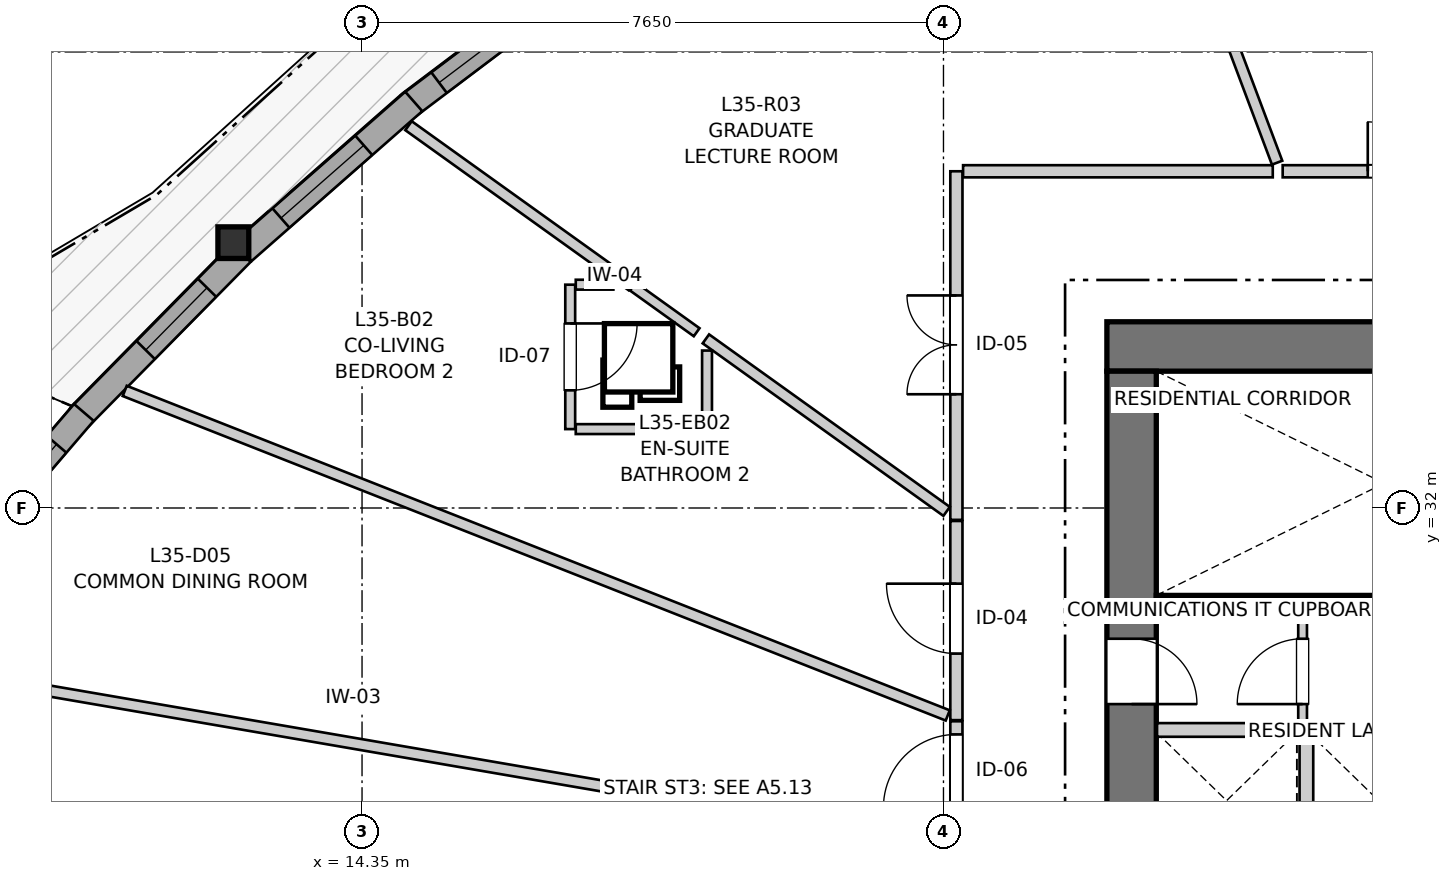
"""IFC4 building model, lengths in metres.
Left out: names, types, materials, properties, quantities, classifications, styles, units other than length and angle.
Written with IfcOpenShell. Run it as: python <this file> out.ifc"""

import sys

from ifc_helpers import new_model, si_unit, direction, frame, frame_2d, origin, origin_2d, place, context, subcontext, project, spatial, rectangle, i_section, extrude, source, transform, mapped, element, fill, save


model = new_model("IFC4")
c1 = context("Model", 3, precision=1e-05, world=origin(), true_north=direction((0.0, 1.0)))
c2 = subcontext(c1, "Body", "Model", "MODEL_VIEW")
j1 = project(units=[si_unit("LENGTHUNIT", "METRE"), si_unit("PLANEANGLEUNIT", "RADIAN")], contexts=[c1])
p1 = place(None, origin())
s1 = spatial("IfcSite", under=j1, at=p1, CompositionType="ELEMENT")
p2 = place(p1, origin())
s2 = spatial("IfcBuilding", under=s1, at=p2, CompositionType="ELEMENT")
p3 = place(p2, frame((0.0, 0.0, 118.4)))
s3 = spatial("IfcBuildingStorey", under=s2, at=p3, CompositionType="ELEMENT", Elevation=118.4)
p4 = place(p3, frame((36.55, 34.125, 0.0), z_axis=(0.0, 0.0, 1.0), x_axis=(-1.0, 0.0, 0.0)))
e1 = element("IfcWall", 1, at=p4, inside=s3, PredefinedType="SHEAR", context=c2, shape_type="SweptSolid", body=[
    extrude(rectangle(XDim=12.4, YDim=0.65, at=frame_2d((6.2, 0.0))), origin(), (0.0, 0.0, 1.0), 2.95),
])
p5 = place(p3, frame((24.475, 33.8, 0.0), z_axis=(0.0, 0.0, 1.0), x_axis=(0.0, -1.0, 0.0)))
e2 = element("IfcWall", 2, at=p5, inside=s3, PredefinedType="SHEAR", context=c2, shape_type="SweptSolid", body=[
    extrude(rectangle(XDim=15.6, YDim=0.65, at=frame_2d((7.8, 0.0))), origin(), (0.0, 0.0, 1.0), 2.95),
])
p6 = place(p5, frame((7.05, 0.0, 0.0)))
e3 = element("IfcOpeningElement", 3, at=p6, cuts=e2, PredefinedType="OPENING", context=c2, shape_type="SweptSolid", body=[
    extrude(rectangle(XDim=1.5, YDim=2.15, at=frame_2d((0.75, 1.075))), frame((0.0, 0.335, 0.0), z_axis=(0.0, -1.0, 0.0), x_axis=(1.0, 0.0, 0.0)), (0.0, 0.0, 1.0), 0.67),
])
p7 = place(p5, frame((3.52, 0.0, 0.0)))
e4 = element("IfcOpeningElement", 4, at=p7, cuts=e2, PredefinedType="OPENING", context=c2, shape_type="SweptSolid", body=[
    extrude(rectangle(XDim=0.86, YDim=2.05, at=frame_2d((0.43, 1.025))), frame((0.0, 0.335, 0.0), z_axis=(0.0, -1.0, 0.0), x_axis=(1.0, 0.0, 0.0)), (0.0, 0.0, 1.0), 0.67),
])
p8 = place(p5, frame((11.22, 0.0, 0.0)))
e5 = element("IfcOpeningElement", 5, at=p8, cuts=e2, PredefinedType="OPENING", context=c2, shape_type="SweptSolid", body=[
    extrude(rectangle(XDim=0.86, YDim=2.05, at=frame_2d((0.43, 1.025))), frame((0.0, 0.335, 0.0), z_axis=(0.0, -1.0, 0.0), x_axis=(1.0, 0.0, 0.0)), (0.0, 0.0, 1.0), 0.67),
])
p9 = place(p3, frame((24.8, 30.7, 0.0), z_axis=(0.0, 0.0, 1.0), x_axis=(1.0, 0.0, 0.0)))
e6 = element("IfcWall", 6, at=p9, inside=s3, PredefinedType="SHEAR", context=c2, shape_type="SweptSolid", body=[
    extrude(rectangle(XDim=11.1, YDim=0.3, at=frame_2d((5.55, 0.0))), origin(), (0.0, 0.0, 1.0), 2.95),
])
p10 = place(p9, frame((6.22, 0.0, 0.0)))
e7 = element("IfcOpeningElement", 7, at=p10, cuts=e6, PredefinedType="OPENING", context=c2, shape_type="SweptSolid", body=[
    extrude(rectangle(XDim=0.98, YDim=2.15, at=frame_2d((0.49, 1.075))), frame((0.0, 0.16, 0.0), z_axis=(0.0, -1.0, 0.0), x_axis=(1.0, 0.0, 0.0)), (0.0, 0.0, 1.0), 0.32),
])
p11 = place(p9, frame((9.15, 0.0, 0.0)))
e8 = element("IfcOpeningElement", 8, at=p11, cuts=e6, PredefinedType="OPENING", context=c2, shape_type="SweptSolid", body=[
    extrude(rectangle(XDim=1.15, YDim=2.15, at=frame_2d((0.575, 1.075))), frame((0.0, 0.16, 0.0), z_axis=(0.0, -1.0, 0.0), x_axis=(1.0, 0.0, 0.0)), (0.0, 0.0, 1.0), 0.32),
])
m1 = source(origin(), c2, "Body", "SweptSolid", [
    extrude(i_section(OverallWidth=0.406, OverallDepth=0.416, WebThickness=0.027, FlangeThickness=0.044, FilletRadius=0.015, at=origin_2d()), origin(), (0.0, 0.0, 1.0), 2.95),
])
p12 = place(p3, frame((12.657, 35.491, 0.0), z_axis=(0.0, 0.0, 1.0), x_axis=(1.0, 0.0, 0.0)))
e9 = element("IfcColumn", 9, at=p12, inside=s3, PredefinedType="PILASTER", context=c2, shape_type="MappedRepresentation", body=[
    mapped(m1, transform((0.0, 0.0, 0.0), x_axis=(1.0, 0.0, 0.0), y_axis=(0.0, 1.0, 0.0), z_axis=(0.0, 0.0, 1.0), scale=1.0)),
])
p13 = place(p3, frame((17.154, 38.947, 0.0), z_axis=(0.0, 0.0, 1.0), x_axis=(-0.798332692302, -0.602216665663, 0.0)))
e10 = element("IfcWall", 10, at=p13, inside=s3, PredefinedType="SOLIDWALL", context=c2, shape_type="SweptSolid", body=[
    extrude(rectangle(XDim=2.746, YDim=0.34, at=frame_2d((1.373, 0.0))), origin(), (0.0, 0.0, 1.0), 2.48),
])
p14 = place(p13, frame((0.493, 0.0, 0.82)))
e11 = element("IfcOpeningElement", 11, at=p14, cuts=e10, PredefinedType="OPENING", context=c2, shape_type="SweptSolid", body=[
    extrude(rectangle(XDim=1.75, YDim=1.3, at=frame_2d((0.875, 0.65))), frame((0.0, 0.18, 0.0), z_axis=(0.0, -1.0, 0.0), x_axis=(1.0, 0.0, 0.0)), (0.0, 0.0, 1.0), 0.36),
])
p15 = place(p3, frame((15.031, 37.349, 0.0), z_axis=(0.0, 0.0, 1.0), x_axis=(-0.751472812955, -0.659764057364, 0.0)))
e12 = element("IfcWall", 12, at=p15, inside=s3, PredefinedType="SOLIDWALL", context=c2, shape_type="SweptSolid", body=[
    extrude(rectangle(XDim=2.99, YDim=0.34, at=frame_2d((1.495, 0.0))), origin(), (0.0, 0.0, 1.0), 2.48),
])
p16 = place(p15, frame((0.875, 0.0, 0.82)))
e13 = element("IfcOpeningElement", 13, at=p16, cuts=e12, PredefinedType="OPENING", context=c2, shape_type="SweptSolid", body=[
    extrude(rectangle(XDim=1.45, YDim=1.25, at=frame_2d((0.725, 0.625))), frame((0.0, 0.18, 0.0), z_axis=(0.0, -1.0, 0.0), x_axis=(1.0, 0.0, 0.0)), (0.0, 0.0, 1.0), 0.36),
])
p17 = place(p3, frame((12.764, 35.357, 0.0), z_axis=(0.0, 0.0, 1.0), x_axis=(-0.701906045867, -0.712269543625, 0.0)))
e14 = element("IfcWall", 14, at=p17, inside=s3, PredefinedType="SOLIDWALL", context=c2, shape_type="SweptSolid", body=[
    extrude(rectangle(XDim=3.039, YDim=0.34, at=frame_2d((1.52, 0.0))), origin(), (0.0, 0.0, 1.0), 2.48),
])
p18 = place(p17, frame((0.646, 0.0, 0.82)))
e15 = element("IfcOpeningElement", 15, at=p18, cuts=e14, PredefinedType="OPENING", context=c2, shape_type="SweptSolid", body=[
    extrude(rectangle(XDim=1.15, YDim=1.2, at=frame_2d((0.575, 0.6))), frame((0.0, 0.18, 0.0), z_axis=(0.0, -1.0, 0.0), x_axis=(1.0, 0.0, 0.0)), (0.0, 0.0, 1.0), 0.36),
])
p19 = place(p3, frame((10.69, 33.257, 0.0), z_axis=(0.0, 0.0, 1.0), x_axis=(-0.650763576187, -0.759280427714, 0.0)))
e16 = element("IfcWall", 16, at=p19, inside=s3, PredefinedType="SOLIDWALL", context=c2, shape_type="SweptSolid", body=[
    extrude(rectangle(XDim=2.893, YDim=0.34, at=frame_2d((1.447, 0.0))), origin(), (0.0, 0.0, 1.0), 2.48),
])
p20 = place(p19, frame((0.552, 0.0, 0.82)))
e17 = element("IfcOpeningElement", 17, at=p20, cuts=e16, PredefinedType="OPENING", context=c2, shape_type="SweptSolid", body=[
    extrude(rectangle(XDim=1.8, YDim=1.45, at=frame_2d((0.9, 0.725))), frame((0.0, 0.18, 0.0), z_axis=(0.0, -1.0, 0.0), x_axis=(1.0, 0.0, 0.0)), (0.0, 0.0, 1.0), 0.36),
])
p21 = place(p3, frame((24.81, 29.08, 0.0), z_axis=(0.0, 0.0, 1.0), x_axis=(1.0, 0.0, 0.0)))
e18 = element("IfcWall", 18, at=p21, inside=s3, PredefinedType="PARTITIONING", context=c2, shape_type="SweptSolid", body=[
    extrude(rectangle(XDim=5.84, YDim=0.18, at=frame_2d((2.92, 0.0))), origin(), (0.0, 0.0, 1.0), 2.95),
])
p22 = place(p3, frame((26.775, 27.2, 0.0), z_axis=(0.0, 0.0, 1.0), x_axis=(0.0, 1.0, 0.0)))
e19 = element("IfcWall", 19, at=p22, inside=s3, PredefinedType="PARTITIONING", context=c2, shape_type="SweptSolid", body=[
    extrude(rectangle(XDim=1.78, YDim=0.18, at=frame_2d((0.89, 0.0))), origin(), (0.0, 0.0, 1.0), 2.95),
])
p23 = place(p3, frame((26.725, 29.16, 0.0), z_axis=(0.0, 0.0, 1.0), x_axis=(0.0, 1.0, 0.0)))
e20 = element("IfcWall", 20, at=p23, inside=s3, PredefinedType="PARTITIONING", context=c2, shape_type="SweptSolid", body=[
    extrude(rectangle(XDim=1.38, YDim=0.115, at=frame_2d((0.69, 0.0))), origin(), (0.0, 0.0, 1.0), 2.95),
])
p24 = place(p23, frame((0.26, 0.0, 0.0)))
e21 = element("IfcOpeningElement", 21, at=p24, cuts=e20, PredefinedType="OPENING", context=c2, shape_type="SweptSolid", body=[
    extrude(rectangle(XDim=0.86, YDim=2.05, at=frame_2d((0.43, 1.025))), frame((0.0, 0.067, 0.0), z_axis=(0.0, -1.0, 0.0), x_axis=(1.0, 0.0, 0.0)), (0.0, 0.0, 1.0), 0.135),
])
p25 = place(p3, frame((22.17, 31.844, 0.0), z_axis=(0.0, 0.0, 1.0), x_axis=(0.0, 1.0, 0.0)))
e22 = element("IfcWall", 22, at=p25, inside=s3, PredefinedType="PARTITIONING", context=c2, shape_type="SweptSolid", body=[
    extrude(rectangle(XDim=4.586, YDim=0.16, at=frame_2d((2.293, 0.0))), origin(), (0.0, 0.0, 1.0), 2.95),
])
p26 = place(p25, frame((1.653, 0.0, 0.0)))
e23 = element("IfcOpeningElement", 23, at=p26, cuts=e22, PredefinedType="OPENING", context=c2, shape_type="SweptSolid", body=[
    extrude(rectangle(XDim=1.3, YDim=2.1, at=frame_2d((0.65, 1.05))), frame((0.0, 0.09, 0.0), z_axis=(0.0, -1.0, 0.0), x_axis=(1.0, 0.0, 0.0)), (0.0, 0.0, 1.0), 0.18),
])
p27 = place(p3, frame((26.463, 36.43, 0.0), z_axis=(0.0, 0.0, 1.0), x_axis=(1.0, 0.0, 0.0)))
e24 = element("IfcWall", 24, at=p27, inside=s3, PredefinedType="PARTITIONING", context=c2, shape_type="SweptSolid", body=[
    extrude(rectangle(XDim=3.585, YDim=0.16, at=frame_2d((1.792, 0.0))), origin(), (0.0, 0.0, 1.0), 2.95),
])
p28 = place(p27, frame((1.119, 0.0, 0.0)))
e25 = element("IfcOpeningElement", 25, at=p28, cuts=e24, PredefinedType="OPENING", context=c2, shape_type="SweptSolid", body=[
    extrude(rectangle(XDim=1.3, YDim=2.1, at=frame_2d((0.65, 1.05))), frame((0.0, 0.09, 0.0), z_axis=(0.0, -1.0, 0.0), x_axis=(1.0, 0.0, 0.0)), (0.0, 0.0, 1.0), 0.18),
])
p29 = place(p3, frame((22.17, 29.209, 0.0), z_axis=(0.0, 0.0, 1.0), x_axis=(0.0, 1.0, 0.0)))
e26 = element("IfcWall", 26, at=p29, inside=s3, PredefinedType="PARTITIONING", context=c2, shape_type="SweptSolid", body=[
    extrude(rectangle(XDim=2.62, YDim=0.16, at=frame_2d((1.31, 0.0))), origin(), (0.0, 0.0, 1.0), 2.95),
])
p30 = place(p29, frame((0.875, 0.0, 0.0)))
e27 = element("IfcOpeningElement", 27, at=p30, cuts=e26, PredefinedType="OPENING", context=c2, shape_type="SweptSolid", body=[
    extrude(rectangle(XDim=0.92, YDim=2.1, at=frame_2d((0.46, 1.05))), frame((0.0, 0.09, 0.0), z_axis=(0.0, -1.0, 0.0), x_axis=(1.0, 0.0, 0.0)), (0.0, 0.0, 1.0), 0.18),
])
p31 = place(p3, frame((17.089, 34.938, 0.0), z_axis=(0.0, 0.0, 1.0), x_axis=(0.0, -1.0, 0.0)))
e28 = element("IfcWall", 28, at=p31, inside=s3, PredefinedType="PARTITIONING", context=c2, shape_type="SweptSolid", body=[
    extrude(rectangle(XDim=1.9, YDim=0.13, at=frame_2d((0.95, 0.0))), origin(), (0.0, 0.0, 1.0), 2.95),
])
p32 = place(p31, frame((0.51, 0.0, 0.0)))
e29 = element("IfcOpeningElement", 29, at=p32, cuts=e28, PredefinedType="OPENING", context=c2, shape_type="SweptSolid", body=[
    extrude(rectangle(XDim=0.88, YDim=2.05, at=frame_2d((0.44, 1.025))), frame((0.0, 0.075, 0.0), z_axis=(0.0, -1.0, 0.0), x_axis=(1.0, 0.0, 0.0)), (0.0, 0.0, 1.0), 0.15),
])
p33 = place(p3, frame((22.17, 27.85, 0.0), z_axis=(0.0, 0.0, 1.0), x_axis=(0.0, 1.0, 0.0)))
e30 = element("IfcWall", 30, at=p33, inside=s3, PredefinedType="PARTITIONING", context=c2, shape_type="SweptSolid", body=[
    extrude(rectangle(XDim=1.344, YDim=0.16, at=frame_2d((0.672, 0.0))), origin(), (0.0, 0.0, 1.0), 2.95),
])
p34 = place(p33, frame((0.211, 0.0, 0.0)))
e31 = element("IfcOpeningElement", 31, at=p34, cuts=e30, PredefinedType="OPENING", context=c2, shape_type="SweptSolid", body=[
    extrude(rectangle(XDim=0.96, YDim=2.1, at=frame_2d((0.48, 1.05))), frame((0.0, 0.09, 0.0), z_axis=(0.0, -1.0, 0.0), x_axis=(1.0, 0.0, 0.0)), (0.0, 0.0, 1.0), 0.18),
])
p35 = place(p3, frame((7.893, 29.996, 0.0), z_axis=(0.0, 0.0, 1.0), x_axis=(0.985544917876, -0.169414328938, 0.0)))
e32 = element("IfcWall", 32, at=p35, inside=s3, PredefinedType="PARTITIONING", context=c2, shape_type="SweptSolid", body=[
    extrude(rectangle(XDim=12.664, YDim=0.145, at=frame_2d((6.332, 0.0))), origin(), (0.0, 0.0, 1.0), 2.95),
])
p36 = place(p3, frame((11.228, 33.54, 0.0), z_axis=(0.0, 0.0, 1.0), x_axis=(0.930301058265, -0.366796866114, 0.0)))
e33 = element("IfcWall", 33, at=p36, inside=s3, PredefinedType="PARTITIONING", context=c2, shape_type="SweptSolid", body=[
    extrude(rectangle(XDim=11.639, YDim=0.145, at=frame_2d((5.82, 0.0))), origin(), (0.0, 0.0, 1.0), 2.95),
])
p37 = place(p3, frame((24.107, 42.621, 0.0), z_axis=(0.0, 0.0, 1.0), x_axis=(0.351605509999, -0.93614826034, 0.0)))
e34 = element("IfcWall", 34, at=p37, inside=s3, PredefinedType="PARTITIONING", context=c2, shape_type="SweptSolid", body=[
    extrude(rectangle(XDim=6.493, YDim=0.145, at=frame_2d((3.247, 0.0))), origin(), (0.0, 0.0, 1.0), 2.95),
])
p38 = place(p3, frame((22.258, 36.43, 0.0), z_axis=(0.0, 0.0, 1.0), x_axis=(1.0, 0.0, 0.0)))
e35 = element("IfcWall", 35, at=p38, inside=s3, PredefinedType="PARTITIONING", context=c2, shape_type="SweptSolid", body=[
    extrude(rectangle(XDim=4.074, YDim=0.16, at=frame_2d((2.037, 0.0))), origin(), (0.0, 0.0, 1.0), 2.588),
])
p39 = place(p3, frame((18.874, 34.225, 0.0), z_axis=(0.0, 0.0, 1.0), x_axis=(0.812826521731, -0.582505833079, 0.0)))
e36 = element("IfcWall", 36, at=p39, inside=s3, PredefinedType="PARTITIONING", context=c2, shape_type="SweptSolid", body=[
    extrude(rectangle(XDim=3.896, YDim=0.145, at=frame_2d((1.948, 0.0))), origin(), (0.0, 0.0, 1.0), 2.95),
])
p40 = place(p3, frame((14.961, 37.03, 0.0), z_axis=(0.0, 0.0, 1.0), x_axis=(0.812838437321, -0.582489205748, 0.0)))
e37 = element("IfcWall", 37, at=p40, inside=s3, PredefinedType="PARTITIONING", context=c2, shape_type="SweptSolid", body=[
    extrude(rectangle(XDim=3.616, YDim=0.145, at=frame_2d((1.808, 0.0))), origin(), (0.0, 0.0, 1.0), 2.95),
])
p41 = place(p3, frame((17.162, 33.038, 0.0), z_axis=(0.0, 0.0, 1.0), x_axis=(1.0, 0.0, 0.0)))
e38 = element("IfcWall", 38, at=p41, inside=s3, PredefinedType="PARTITIONING", context=c2, shape_type="SweptSolid", body=[
    extrude(rectangle(XDim=1.727, YDim=0.13, at=frame_2d((0.863, 0.0))), origin(), (0.0, 0.0, 1.0), 2.95),
])
p42 = place(p3, frame((18.889, 33.111, 0.0), z_axis=(0.0, 0.0, 1.0), x_axis=(0.0, 1.0, 0.0)))
e39 = element("IfcWall", 39, at=p42, inside=s3, PredefinedType="PARTITIONING", context=c2, shape_type="SweptSolid", body=[
    extrude(rectangle(XDim=0.96, YDim=0.13, at=frame_2d((0.48, 0.0))), origin(), (0.0, 0.0, 1.0), 2.95),
])
p43 = place(p3, frame((17.913, 34.914, 0.0), z_axis=(0.0, 0.0, 1.0), x_axis=(0.812774229327, -0.582578794792, 0.0)))
e40 = element("IfcWall", 40, at=p43, inside=s3, PredefinedType="PARTITIONING", context=c2, shape_type="SweptSolid", body=[
    extrude(rectangle(XDim=1.033, YDim=0.13, at=frame_2d((0.517, 0.0))), origin(), (0.0, 0.0, 1.0), 2.95),
])
p44 = place(p3, frame((17.162, 34.938, 0.0), z_axis=(0.0, 0.0, 1.0), x_axis=(1.0, 0.0, 0.0)))
e41 = element("IfcWall", 41, at=p44, inside=s3, PredefinedType="PARTITIONING", context=c2, shape_type="SweptSolid", body=[
    extrude(rectangle(XDim=0.495, YDim=0.13, at=frame_2d((0.247, 0.0))), origin(), (0.0, 0.0, 1.0), 2.95),
])
m2 = source(origin(), c2, "Body", "SweptSolid", [
    extrude(rectangle(XDim=1.75, YDim=1.3, at=frame_2d((0.875, 0.65))), frame((0.0, 0.03, 0.0), z_axis=(0.0, -1.0, 0.0), x_axis=(1.0, 0.0, 0.0)), (0.0, 0.0, 1.0), 0.06),
])
p45 = place(p14, origin())
e42 = element("IfcWindow", 42, at=p45, inside=s3, PartitioningType="SINGLE_PANEL", PredefinedType="WINDOW", context=c2, shape_type="MappedRepresentation", body=[
    mapped(m2, transform((0.0, 0.0, 0.0), x_axis=(1.0, 0.0, 0.0), y_axis=(0.0, 1.0, 0.0), z_axis=(0.0, 0.0, 1.0), scale=1.0)),
])
fill(e11, e42)
m3 = source(origin(), c2, "Body", "SweptSolid", [
    extrude(rectangle(XDim=1.45, YDim=1.25, at=frame_2d((0.725, 0.625))), frame((0.0, 0.03, 0.0), z_axis=(0.0, -1.0, 0.0), x_axis=(1.0, 0.0, 0.0)), (0.0, 0.0, 1.0), 0.06),
])
p46 = place(p16, origin())
e43 = element("IfcWindow", 43, at=p46, inside=s3, PartitioningType="SINGLE_PANEL", PredefinedType="WINDOW", context=c2, shape_type="MappedRepresentation", body=[
    mapped(m3, transform((0.0, 0.0, 0.0), x_axis=(1.0, 0.0, 0.0), y_axis=(0.0, 1.0, 0.0), z_axis=(0.0, 0.0, 1.0), scale=1.0)),
])
fill(e13, e43)
m4 = source(origin(), c2, "Body", "SweptSolid", [
    extrude(rectangle(XDim=1.15, YDim=1.2, at=frame_2d((0.575, 0.6))), frame((0.0, 0.03, 0.0), z_axis=(0.0, -1.0, 0.0), x_axis=(1.0, 0.0, 0.0)), (0.0, 0.0, 1.0), 0.06),
])
p47 = place(p18, origin())
e44 = element("IfcWindow", 44, at=p47, inside=s3, PartitioningType="SINGLE_PANEL", PredefinedType="WINDOW", context=c2, shape_type="MappedRepresentation", body=[
    mapped(m4, transform((0.0, 0.0, 0.0), x_axis=(1.0, 0.0, 0.0), y_axis=(0.0, 1.0, 0.0), z_axis=(0.0, 0.0, 1.0), scale=1.0)),
])
fill(e15, e44)
m5 = source(origin(), c2, "Body", "SweptSolid", [
    extrude(rectangle(XDim=1.8, YDim=1.45, at=frame_2d((0.9, 0.725))), frame((0.0, 0.03, 0.0), z_axis=(0.0, -1.0, 0.0), x_axis=(1.0, 0.0, 0.0)), (0.0, 0.0, 1.0), 0.06),
])
p48 = place(p20, origin())
e45 = element("IfcWindow", 45, at=p48, inside=s3, PartitioningType="SINGLE_PANEL", PredefinedType="WINDOW", context=c2, shape_type="MappedRepresentation", body=[
    mapped(m5, transform((0.0, 0.0, 0.0), x_axis=(1.0, 0.0, 0.0), y_axis=(0.0, 1.0, 0.0), z_axis=(0.0, 0.0, 1.0), scale=1.0)),
])
fill(e17, e45)
m6 = source(origin(), c2, "Body", "SweptSolid", [
    extrude(rectangle(XDim=0.86, YDim=2.05, at=frame_2d((0.43, 1.025))), frame((0.0, 0.025, 0.0), z_axis=(0.0, -1.0, 0.0), x_axis=(1.0, 0.0, 0.0)), (0.0, 0.0, 1.0), 0.05),
])
p49 = place(p7, origin())
e46 = element("IfcDoor", 46, at=p49, inside=s3, OperationType="SINGLE_SWING_RIGHT", PredefinedType="DOOR", context=c2, shape_type="MappedRepresentation", body=[
    mapped(m6, transform((0.0, 0.0, 0.0), x_axis=(1.0, 0.0, 0.0), y_axis=(0.0, 1.0, 0.0), z_axis=(0.0, 0.0, 1.0), scale=1.0)),
])
fill(e4, e46)
p50 = place(p24, origin())
e47 = element("IfcDoor", 47, at=p50, inside=s3, OperationType="SINGLE_SWING_LEFT", PredefinedType="DOOR", context=c2, shape_type="MappedRepresentation", body=[
    mapped(m6, transform((0.0, 0.0, 0.0), x_axis=(1.0, 0.0, 0.0), y_axis=(0.0, 1.0, 0.0), z_axis=(0.0, 0.0, 1.0), scale=1.0)),
])
fill(e21, e47)
m7 = source(origin(), c2, "Body", "SweptSolid", [
    extrude(rectangle(XDim=1.3, YDim=2.1, at=frame_2d((0.65, 1.05))), frame((0.0, 0.025, 0.0), z_axis=(0.0, -1.0, 0.0), x_axis=(1.0, 0.0, 0.0)), (0.0, 0.0, 1.0), 0.05),
])
p51 = place(p26, origin())
e48 = element("IfcDoor", 48, at=p51, inside=s3, OperationType="DOUBLE_DOOR_SINGLE_SWING", PredefinedType="DOOR", context=c2, shape_type="MappedRepresentation", body=[
    mapped(m7, transform((0.0, 0.0, 0.0), x_axis=(1.0, 0.0, 0.0), y_axis=(0.0, 1.0, 0.0), z_axis=(0.0, 0.0, 1.0), scale=1.0)),
])
fill(e23, e48)
p52 = place(p28, origin())
e49 = element("IfcDoor", 49, at=p52, inside=s3, OperationType="DOUBLE_DOOR_SINGLE_SWING", PredefinedType="DOOR", context=c2, shape_type="MappedRepresentation", body=[
    mapped(m7, transform((0.0, 0.0, 0.0), x_axis=(1.0, 0.0, 0.0), y_axis=(0.0, 1.0, 0.0), z_axis=(0.0, 0.0, 1.0), scale=1.0)),
])
fill(e25, e49)
m8 = source(origin(), c2, "Body", "SweptSolid", [
    extrude(rectangle(XDim=0.92, YDim=2.1, at=frame_2d((0.46, 1.05))), frame((0.0, 0.025, 0.0), z_axis=(0.0, -1.0, 0.0), x_axis=(1.0, 0.0, 0.0)), (0.0, 0.0, 1.0), 0.05),
])
p53 = place(p30, origin())
e50 = element("IfcDoor", 50, at=p53, inside=s3, OperationType="SINGLE_SWING_RIGHT", PredefinedType="DOOR", context=c2, shape_type="MappedRepresentation", body=[
    mapped(m8, transform((0.0, 0.0, 0.0), x_axis=(1.0, 0.0, 0.0), y_axis=(0.0, 1.0, 0.0), z_axis=(0.0, 0.0, 1.0), scale=1.0)),
])
fill(e27, e50)
m9 = source(origin(), c2, "Body", "SweptSolid", [
    extrude(rectangle(XDim=0.88, YDim=2.05, at=frame_2d((0.44, 1.025))), frame((0.0, 0.025, 0.0), z_axis=(0.0, -1.0, 0.0), x_axis=(1.0, 0.0, 0.0)), (0.0, 0.0, 1.0), 0.05),
])
p54 = place(p32, origin())
e51 = element("IfcDoor", 51, at=p54, inside=s3, OperationType="SINGLE_SWING_LEFT", PredefinedType="DOOR", context=c2, shape_type="MappedRepresentation", body=[
    mapped(m9, transform((0.0, 0.0, 0.0), x_axis=(1.0, 0.0, 0.0), y_axis=(0.0, 1.0, 0.0), z_axis=(0.0, 0.0, 1.0), scale=1.0)),
])
fill(e29, e51)
m10 = source(origin(), c2, "Body", "SweptSolid", [
    extrude(rectangle(XDim=0.96, YDim=2.1, at=frame_2d((0.48, 1.05))), frame((0.0, 0.025, 0.0), z_axis=(0.0, -1.0, 0.0), x_axis=(1.0, 0.0, 0.0)), (0.0, 0.0, 1.0), 0.05),
])
p55 = place(p34, origin())
e52 = element("IfcDoor", 52, at=p55, inside=s3, OperationType="SINGLE_SWING_LEFT", PredefinedType="DOOR", context=c2, shape_type="MappedRepresentation", body=[
    mapped(m10, transform((0.0, 0.0, 0.0), x_axis=(1.0, 0.0, 0.0), y_axis=(0.0, 1.0, 0.0), z_axis=(0.0, 0.0, 1.0), scale=1.0)),
])
fill(e31, e52)
save(model, sys.argv[1])
